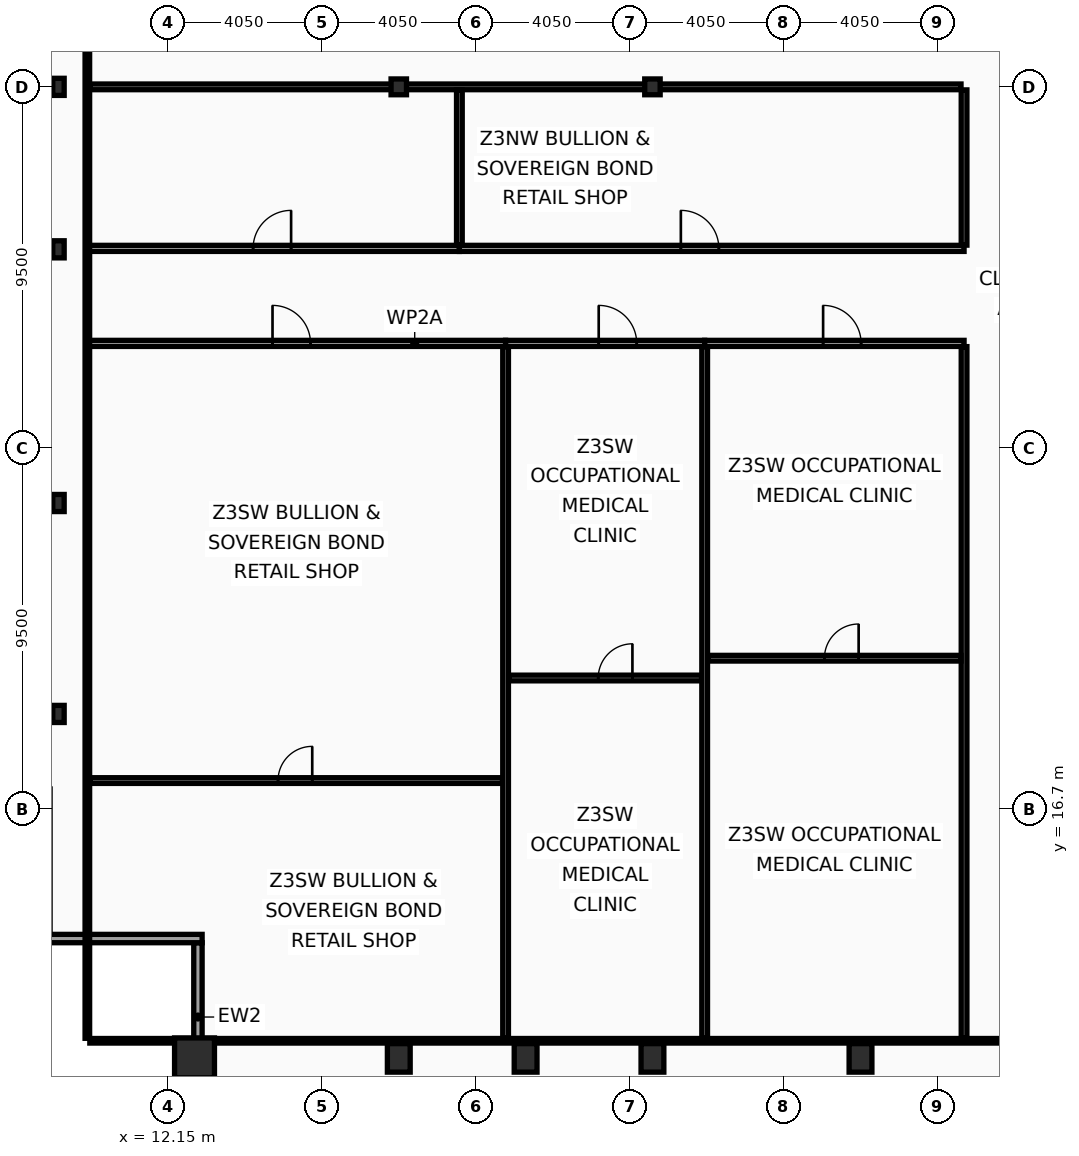
"""IFC4 building model, lengths in metres.
Left out: names, types, materials, properties, quantities, classifications, styles, units other than length and angle.
Written with IfcOpenShell. Run it as: python <this file> out.ifc"""

import sys

from ifc_helpers import new_model, si_unit, direction, frame, frame_2d, origin, origin_2d, place, context, subcontext, project, spatial, rectangle, hollow_rectangle, i_section, extrude, element, fill, save


model = new_model("IFC4")
c1 = context("Model", 3, precision=1e-05, world=origin(), true_north=direction((0.0, 1.0)))
c2 = subcontext(c1, "Body", "Model", "MODEL_VIEW")
j1 = project(units=[si_unit("LENGTHUNIT", "METRE"), si_unit("PLANEANGLEUNIT", "RADIAN")], contexts=[c1])
p1 = place(None, origin())
s1 = spatial("IfcSite", under=j1, at=p1, CompositionType="ELEMENT")
p2 = place(p1, origin())
s2 = spatial("IfcBuilding", under=s1, at=p2, CompositionType="ELEMENT")
p3 = place(p2, frame((0.0, 0.0, 249.8)))
s3 = spatial("IfcBuildingStorey", under=s2, at=p3, CompositionType="ELEMENT", Elevation=249.8)
p4 = place(p3, frame((12.85, 10.15, 0.0), z_axis=(0.0, 0.0, 1.0), x_axis=(1.0, 0.0, 0.0)))
e1 = element("IfcColumn", 1, at=p4, inside=s3, PredefinedType="COLUMN", context=c2, shape_type="SweptSolid", body=[
    extrude(hollow_rectangle(XDim=1.05, YDim=1.05, WallThickness=0.055, at=origin_2d()), origin(), (0.0, 0.0, 1.0), 3.6),
])
for number, where, z_axis, x_axis in (
    (2, (18.225, 10.15, 0.0), (0.0, 0.0, 1.0), (1.0, 0.0, 0.0)),
    (3, (21.562, 10.15, 0.0), (0.0, 0.0, 1.0), (1.0, 0.0, 0.0)),
    (4, (24.9, 10.15, 0.0), (0.0, 0.0, 1.0), (1.0, 0.0, 0.0)),
    (5, (30.375, 10.15, 0.0), (0.0, 0.0, 1.0), (1.0, 0.0, 0.0)),
):
    element("IfcColumn", number, at=place(p3, frame(where, z_axis=z_axis, x_axis=x_axis)), inside=s3, PredefinedType="COLUMN", context=c2, shape_type="SweptSolid", body=[
        extrude(hollow_rectangle(XDim=0.6, YDim=0.75, WallThickness=0.045, at=origin_2d()), origin(), (0.0, 0.0, 1.0), 3.6),
    ])
for number, where, z_axis, x_axis in (
    (6, (9.27, 19.2, 0.0), (0.0, 0.0, 1.0), (1.0, 0.0, 0.0)),
    (7, (9.27, 24.75, 0.0), (0.0, 0.0, 1.0), (1.0, 0.0, 0.0)),
    (8, (9.27, 31.425, 0.0), (0.0, 0.0, 1.0), (1.0, 0.0, 0.0)),
    (9, (9.27, 35.7, 0.0), (0.0, 0.0, 1.0), (1.0, 0.0, 0.0)),
):
    element("IfcColumn", number, at=place(p3, frame(where, z_axis=z_axis, x_axis=x_axis)), inside=s3, PredefinedType="COLUMN", context=c2, shape_type="SweptSolid", body=[
        extrude(i_section(OverallWidth=0.3, OverallDepth=0.45, WebThickness=0.014, FlangeThickness=0.026, at=origin_2d()), origin(), (0.0, 0.0, 1.0), 3.6),
    ])
for number, where, z_axis, x_axis in (
    (10, (18.225, 35.7, 0.0), (0.0, 0.0, 1.0), (1.0, 0.0, 0.0)),
    (11, (24.9, 35.7, 0.0), (0.0, 0.0, 1.0), (1.0, 0.0, 0.0)),
):
    element("IfcColumn", number, at=place(p3, frame(where, z_axis=z_axis, x_axis=x_axis)), inside=s3, PredefinedType="COLUMN", context=c2, shape_type="SweptSolid", body=[
        extrude(i_section(OverallWidth=0.406, OverallDepth=0.416, WebThickness=0.03, FlangeThickness=0.048, at=origin_2d()), origin(), (0.0, 0.0, 1.0), 3.6),
    ])
p5 = place(p3, frame((12.94, 9.27, 0.0), z_axis=(0.0, 0.0, 1.0), x_axis=(0.0, 1.0, 0.0)))
e12 = element("IfcWall", 12, at=p5, inside=s3, PredefinedType="SOLIDWALL", context=c2, shape_type="SweptSolid", body=[
    extrude(rectangle(XDim=3.91, YDim=0.22, at=frame_2d((1.955, 0.0))), origin(), (0.0, 0.0, 1.0), 2.83),
])
p6 = place(p3, frame((13.05, 13.29, 0.0), z_axis=(0.0, 0.0, 1.0), x_axis=(-1.0, 0.0, 0.0)))
e13 = element("IfcWall", 13, at=p6, inside=s3, PredefinedType="SOLIDWALL", context=c2, shape_type="SweptSolid", body=[
    extrude(rectangle(XDim=4.22, YDim=0.22, at=frame_2d((2.11, 0.0))), origin(), (0.0, 0.0, 1.0), 2.83),
])
p7 = place(p3, frame((33.1, 10.665, 0.0), z_axis=(0.0, 0.0, 1.0), x_axis=(0.0, 1.0, 0.0)))
e14 = element("IfcWall", 14, at=p7, inside=s3, PredefinedType="PARTITIONING", context=c2, shape_type="SweptSolid", body=[
    extrude(rectangle(XDim=18.2, YDim=0.15, at=frame_2d((9.1, 0.0))), origin(), (0.0, 0.0, 1.0), 3.03),
])
p8 = place(p3, frame((33.1, 31.535, 0.0), z_axis=(0.0, 0.0, 1.0), x_axis=(0.0, 1.0, 0.0)))
e15 = element("IfcWall", 15, at=p8, inside=s3, PredefinedType="PARTITIONING", context=c2, shape_type="SweptSolid", body=[
    extrude(rectangle(XDim=4.085, YDim=0.15, at=frame_2d((2.042, 0.0))), origin(), (0.0, 0.0, 1.0), 3.03),
])
p9 = place(p3, frame((10.095, 35.7, 0.0), z_axis=(0.0, 0.0, 1.0), x_axis=(1.0, 0.0, 0.0)))
e16 = element("IfcWall", 16, at=p9, inside=s3, PredefinedType="PARTITIONING", context=c2, shape_type="SweptSolid", body=[
    extrude(rectangle(XDim=22.925, YDim=0.15, at=frame_2d((11.462, 0.0))), origin(), (0.0, 0.0, 1.0), 2.78),
])
p10 = place(p3, frame((10.03, 28.95, 0.0), z_axis=(0.0, 0.0, 1.0), x_axis=(1.0, 0.0, 0.0)))
e17 = element("IfcWall", 17, at=p10, inside=s3, PredefinedType="PARTITIONING", context=c2, shape_type="SweptSolid", body=[
    extrude(rectangle(XDim=11.006, YDim=0.16, at=frame_2d((5.503, 0.0))), origin(), (0.0, 0.0, 1.0), 2.78),
])
p11 = place(p10, frame((4.873, 0.0, 0.0)))
e18 = element("IfcOpeningElement", 18, at=p11, cuts=e17, PredefinedType="OPENING", context=c2, shape_type="SweptSolid", body=[
    extrude(rectangle(XDim=1.0, YDim=2.05, at=frame_2d((0.5, 1.025))), frame((0.0, 0.09, 0.0), z_axis=(0.0, -1.0, 0.0), x_axis=(1.0, 0.0, 0.0)), (0.0, 0.0, 1.0), 0.18),
])
p12 = place(p3, frame((10.095, 17.447, 0.0), z_axis=(0.0, 0.0, 1.0), x_axis=(1.0, 0.0, 0.0)))
e19 = element("IfcWall", 19, at=p12, inside=s3, PredefinedType="PARTITIONING", context=c2, shape_type="SweptSolid", body=[
    extrude(rectangle(XDim=10.861, YDim=0.15, at=frame_2d((5.43, 0.0))), origin(), (0.0, 0.0, 1.0), 2.78),
])
p13 = place(p12, frame((4.953, 0.0, 0.0)))
e20 = element("IfcOpeningElement", 20, at=p13, cuts=e19, PredefinedType="OPENING", context=c2, shape_type="SweptSolid", body=[
    extrude(rectangle(XDim=0.9, YDim=2.05, at=frame_2d((0.45, 1.025))), frame((0.0, 0.085, 0.0), z_axis=(0.0, -1.0, 0.0), x_axis=(1.0, 0.0, 0.0)), (0.0, 0.0, 1.0), 0.17),
])
p14 = place(p3, frame((21.036, 28.95, 0.0), z_axis=(0.0, 0.0, 1.0), x_axis=(1.0, 0.0, 0.0)))
e21 = element("IfcWall", 21, at=p14, inside=s3, PredefinedType="PARTITIONING", context=c2, shape_type="SweptSolid", body=[
    extrude(rectangle(XDim=5.238, YDim=0.16, at=frame_2d((2.619, 0.0))), origin(), (0.0, 0.0, 1.0), 2.78),
])
p15 = place(p14, frame((2.45, 0.0, 0.0)))
e22 = element("IfcOpeningElement", 22, at=p15, cuts=e21, PredefinedType="OPENING", context=c2, shape_type="SweptSolid", body=[
    extrude(rectangle(XDim=1.0, YDim=2.05, at=frame_2d((0.5, 1.025))), frame((0.0, 0.09, 0.0), z_axis=(0.0, -1.0, 0.0), x_axis=(1.0, 0.0, 0.0)), (0.0, 0.0, 1.0), 0.18),
])
p16 = place(p3, frame((21.036, 10.665, 0.0), z_axis=(0.0, 0.0, 1.0), x_axis=(0.0, 1.0, 0.0)))
e23 = element("IfcWall", 23, at=p16, inside=s3, PredefinedType="PARTITIONING", context=c2, shape_type="SweptSolid", body=[
    extrude(rectangle(XDim=18.2, YDim=0.15, at=frame_2d((9.1, 0.0))), origin(), (0.0, 0.0, 1.0), 3.03),
])
p17 = place(p3, frame((21.116, 20.146, 0.0), z_axis=(0.0, 0.0, 1.0), x_axis=(1.0, 0.0, 0.0)))
e24 = element("IfcWall", 24, at=p17, inside=s3, PredefinedType="PARTITIONING", context=c2, shape_type="SweptSolid", body=[
    extrude(rectangle(XDim=5.078, YDim=0.15, at=frame_2d((2.539, 0.0))), origin(), (0.0, 0.0, 1.0), 2.78),
])
p18 = place(p17, frame((2.357, 0.0, 0.0)))
e25 = element("IfcOpeningElement", 25, at=p18, cuts=e24, PredefinedType="OPENING", context=c2, shape_type="SweptSolid", body=[
    extrude(rectangle(XDim=0.9, YDim=2.05, at=frame_2d((0.45, 1.025))), frame((0.0, 0.085, 0.0), z_axis=(0.0, -1.0, 0.0), x_axis=(1.0, 0.0, 0.0)), (0.0, 0.0, 1.0), 0.17),
])
p19 = place(p3, frame((26.274, 28.95, 0.0), z_axis=(0.0, 0.0, 1.0), x_axis=(1.0, 0.0, 0.0)))
e26 = element("IfcWall", 26, at=p19, inside=s3, PredefinedType="PARTITIONING", context=c2, shape_type="SweptSolid", body=[
    extrude(rectangle(XDim=6.826, YDim=0.16, at=frame_2d((3.413, 0.0))), origin(), (0.0, 0.0, 1.0), 2.78),
])
p20 = place(p19, frame((3.117, 0.0, 0.0)))
e27 = element("IfcOpeningElement", 27, at=p20, cuts=e26, PredefinedType="OPENING", context=c2, shape_type="SweptSolid", body=[
    extrude(rectangle(XDim=1.0, YDim=2.05, at=frame_2d((0.5, 1.025))), frame((0.0, 0.09, 0.0), z_axis=(0.0, -1.0, 0.0), x_axis=(1.0, 0.0, 0.0)), (0.0, 0.0, 1.0), 0.18),
])
p21 = place(p3, frame((26.274, 10.665, 0.0), z_axis=(0.0, 0.0, 1.0), x_axis=(0.0, 1.0, 0.0)))
e28 = element("IfcWall", 28, at=p21, inside=s3, PredefinedType="PARTITIONING", context=c2, shape_type="SweptSolid", body=[
    extrude(rectangle(XDim=18.2, YDim=0.15, at=frame_2d((9.1, 0.0))), origin(), (0.0, 0.0, 1.0), 3.03),
])
p22 = place(p3, frame((26.354, 20.667, 0.0), z_axis=(0.0, 0.0, 1.0), x_axis=(1.0, 0.0, 0.0)))
e29 = element("IfcWall", 29, at=p22, inside=s3, PredefinedType="PARTITIONING", context=c2, shape_type="SweptSolid", body=[
    extrude(rectangle(XDim=6.666, YDim=0.15, at=frame_2d((3.333, 0.0))), origin(), (0.0, 0.0, 1.0), 2.78),
])
p23 = place(p22, frame((3.072, 0.0, 0.0)))
e30 = element("IfcOpeningElement", 30, at=p23, cuts=e29, PredefinedType="OPENING", context=c2, shape_type="SweptSolid", body=[
    extrude(rectangle(XDim=0.9, YDim=2.05, at=frame_2d((0.45, 1.025))), frame((0.0, 0.085, 0.0), z_axis=(0.0, -1.0, 0.0), x_axis=(1.0, 0.0, 0.0)), (0.0, 0.0, 1.0), 0.17),
])
p24 = place(p3, frame((10.03, 31.45, 0.0), z_axis=(0.0, 0.0, 1.0), x_axis=(1.0, 0.0, 0.0)))
e31 = element("IfcWall", 31, at=p24, inside=s3, PredefinedType="PARTITIONING", context=c2, shape_type="SweptSolid", body=[
    extrude(rectangle(XDim=9.79, YDim=0.16, at=frame_2d((4.895, 0.0))), origin(), (0.0, 0.0, 1.0), 2.78),
])
p25 = place(p24, frame((4.362, 0.0, 0.0)))
e32 = element("IfcOpeningElement", 32, at=p25, cuts=e31, PredefinedType="OPENING", context=c2, shape_type="SweptSolid", body=[
    extrude(rectangle(XDim=1.0, YDim=2.05, at=frame_2d((0.5, 1.025))), frame((0.0, 0.09, 0.0), z_axis=(0.0, -1.0, 0.0), x_axis=(1.0, 0.0, 0.0)), (0.0, 0.0, 1.0), 0.18),
])
p26 = place(p3, frame((19.82, 31.45, 0.0), z_axis=(0.0, 0.0, 1.0), x_axis=(1.0, 0.0, 0.0)))
e33 = element("IfcWall", 33, at=p26, inside=s3, PredefinedType="PARTITIONING", context=c2, shape_type="SweptSolid", body=[
    extrude(rectangle(XDim=13.281, YDim=0.16, at=frame_2d((6.64, 0.0))), origin(), (0.0, 0.0, 1.0), 2.78),
])
p27 = place(p26, frame((5.828, 0.0, 0.0)))
e34 = element("IfcOpeningElement", 34, at=p27, cuts=e33, PredefinedType="OPENING", context=c2, shape_type="SweptSolid", body=[
    extrude(rectangle(XDim=1.0, YDim=2.05, at=frame_2d((0.5, 1.025))), frame((0.0, 0.09, 0.0), z_axis=(0.0, -1.0, 0.0), x_axis=(1.0, 0.0, 0.0)), (0.0, 0.0, 1.0), 0.18),
])
p28 = place(p3, frame((19.82, 31.535, 0.0), z_axis=(0.0, 0.0, 1.0), x_axis=(0.0, 1.0, 0.0)))
e35 = element("IfcWall", 35, at=p28, inside=s3, PredefinedType="PARTITIONING", context=c2, shape_type="SweptSolid", body=[
    extrude(rectangle(XDim=4.085, YDim=0.15, at=frame_2d((2.042, 0.0))), origin(), (0.0, 0.0, 1.0), 3.03),
])
p29 = place(p3, frame((10.03, 10.665, 0.0), z_axis=(0.0, 0.0, 1.0), x_axis=(0.0, 1.0, 0.0)))
e36 = element("IfcWall", 36, at=p29, inside=s3, PredefinedType="PARTITIONING", context=c2, shape_type="SweptSolid", body=[
    extrude(rectangle(XDim=42.11, YDim=0.12, at=frame_2d((21.055, 0.0))), origin(), (0.0, 0.0, 1.0), 2.78),
])
p30 = place(p3, frame((10.095, 10.6, 0.0), z_axis=(0.0, 0.0, 1.0), x_axis=(1.0, 0.0, 0.0)))
e37 = element("IfcWall", 37, at=p30, inside=s3, PredefinedType="PARTITIONING", context=c2, shape_type="SweptSolid", body=[
    extrude(rectangle(XDim=52.71, YDim=0.12, at=frame_2d((26.355, 0.0))), origin(), (0.0, 0.0, 1.0), 2.78),
])
p31 = place(p11, origin())
e38 = element("IfcDoor", 38, at=p31, inside=s3, OperationType="SINGLE_SWING_LEFT", PredefinedType="DOOR", context=c2, shape_type="SweptSolid", body=[
    extrude(rectangle(XDim=1.0, YDim=2.05, at=frame_2d((0.5, 1.025))), frame((0.0, 0.025, 0.0), z_axis=(0.0, -1.0, 0.0), x_axis=(1.0, 0.0, 0.0)), (0.0, 0.0, 1.0), 0.05),
])
fill(e18, e38)
p32 = place(p13, origin())
e39 = element("IfcDoor", 39, at=p32, inside=s3, OperationType="SINGLE_SWING_RIGHT", PredefinedType="DOOR", context=c2, shape_type="SweptSolid", body=[
    extrude(rectangle(XDim=0.9, YDim=2.05, at=frame_2d((0.45, 1.025))), frame((0.0, 0.025, 0.0), z_axis=(0.0, -1.0, 0.0), x_axis=(1.0, 0.0, 0.0)), (0.0, 0.0, 1.0), 0.05),
])
fill(e20, e39)
p33 = place(p15, origin())
e40 = element("IfcDoor", 40, at=p33, inside=s3, OperationType="SINGLE_SWING_LEFT", PredefinedType="DOOR", context=c2, shape_type="SweptSolid", body=[
    extrude(rectangle(XDim=1.0, YDim=2.05, at=frame_2d((0.5, 1.025))), frame((0.0, 0.025, 0.0), z_axis=(0.0, -1.0, 0.0), x_axis=(1.0, 0.0, 0.0)), (0.0, 0.0, 1.0), 0.05),
])
fill(e22, e40)
p34 = place(p18, origin())
e41 = element("IfcDoor", 41, at=p34, inside=s3, OperationType="SINGLE_SWING_RIGHT", PredefinedType="DOOR", context=c2, shape_type="SweptSolid", body=[
    extrude(rectangle(XDim=0.9, YDim=2.05, at=frame_2d((0.45, 1.025))), frame((0.0, 0.025, 0.0), z_axis=(0.0, -1.0, 0.0), x_axis=(1.0, 0.0, 0.0)), (0.0, 0.0, 1.0), 0.05),
])
fill(e25, e41)
p35 = place(p20, origin())
e42 = element("IfcDoor", 42, at=p35, inside=s3, OperationType="SINGLE_SWING_LEFT", PredefinedType="DOOR", context=c2, shape_type="SweptSolid", body=[
    extrude(rectangle(XDim=1.0, YDim=2.05, at=frame_2d((0.5, 1.025))), frame((0.0, 0.025, 0.0), z_axis=(0.0, -1.0, 0.0), x_axis=(1.0, 0.0, 0.0)), (0.0, 0.0, 1.0), 0.05),
])
fill(e27, e42)
p36 = place(p23, origin())
e43 = element("IfcDoor", 43, at=p36, inside=s3, OperationType="SINGLE_SWING_RIGHT", PredefinedType="DOOR", context=c2, shape_type="SweptSolid", body=[
    extrude(rectangle(XDim=0.9, YDim=2.05, at=frame_2d((0.45, 1.025))), frame((0.0, 0.025, 0.0), z_axis=(0.0, -1.0, 0.0), x_axis=(1.0, 0.0, 0.0)), (0.0, 0.0, 1.0), 0.05),
])
fill(e30, e43)
p37 = place(p25, origin())
e44 = element("IfcDoor", 44, at=p37, inside=s3, OperationType="SINGLE_SWING_RIGHT", PredefinedType="DOOR", context=c2, shape_type="SweptSolid", body=[
    extrude(rectangle(XDim=1.0, YDim=2.05, at=frame_2d((0.5, 1.025))), frame((0.0, 0.025, 0.0), z_axis=(0.0, -1.0, 0.0), x_axis=(1.0, 0.0, 0.0)), (0.0, 0.0, 1.0), 0.05),
])
fill(e32, e44)
p38 = place(p27, origin())
e45 = element("IfcDoor", 45, at=p38, inside=s3, OperationType="SINGLE_SWING_LEFT", PredefinedType="DOOR", context=c2, shape_type="SweptSolid", body=[
    extrude(rectangle(XDim=1.0, YDim=2.05, at=frame_2d((0.5, 1.025))), frame((0.0, 0.025, 0.0), z_axis=(0.0, -1.0, 0.0), x_axis=(1.0, 0.0, 0.0)), (0.0, 0.0, 1.0), 0.05),
])
fill(e34, e45)
save(model, sys.argv[1])
